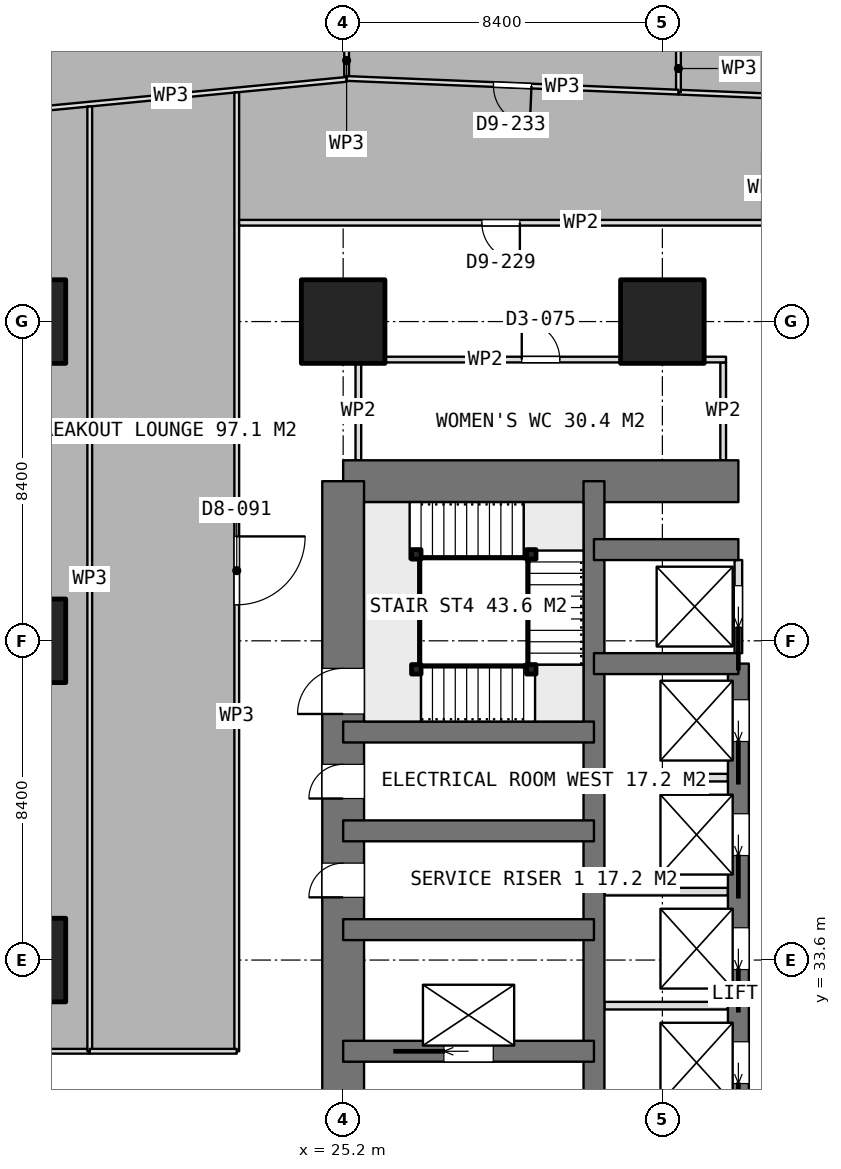
"""IFC4 building model, lengths in metres.
Left out: names, types, materials, properties, quantities, classifications, styles, units other than length and angle.
Written with IfcOpenShell. Run it as: python <this file> out.ifc"""

import sys

from ifc_helpers import new_model, si_unit, direction, frame, frame_2d, origin, origin_2d, place, context, subcontext, project, spatial, rectangle, extrude, element, fill, save


model = new_model("IFC4")
c1 = context("Model", 3, precision=1e-05, world=origin(), true_north=direction((0.0, 1.0)))
c2 = subcontext(c1, "Body", "Model", "MODEL_VIEW")
j1 = project(units=[si_unit("LENGTHUNIT", "METRE"), si_unit("PLANEANGLEUNIT", "RADIAN")], contexts=[c1])
p1 = place(None, origin())
s1 = spatial("IfcSite", under=j1, at=p1, CompositionType="ELEMENT")
p2 = place(p1, origin())
s2 = spatial("IfcBuilding", under=s1, at=p2, CompositionType="ELEMENT")
p3 = place(p2, frame((0.0, 0.0, 66.65)))
s3 = spatial("IfcBuildingStorey", under=s2, at=p3, CompositionType="ELEMENT", Elevation=66.65)
p4 = place(p3, frame((25.2, 46.2, 0.0), z_axis=(0.0, 0.0, 1.0), x_axis=(1.0, 0.0, 0.0)))
e1 = element("IfcWall", 1, at=p4, inside=s3, PredefinedType="SHEAR", context=c2, shape_type="SweptSolid", body=[
    extrude(rectangle(XDim=10.4, YDim=1.1, at=frame_2d((5.2, 0.0))), origin(), (0.0, 0.0, 1.0), 3.75),
])
p5 = place(p3, frame((25.2, 21.0, 0.0), z_axis=(0.0, 0.0, 1.0), x_axis=(0.0, 1.0, 0.0)))
e2 = element("IfcWall", 2, at=p5, inside=s3, PredefinedType="SHEAR", context=c2, shape_type="SweptSolid", body=[
    extrude(rectangle(XDim=25.2, YDim=1.1, at=frame_2d((12.6, 0.0))), origin(), (0.0, 0.0, 1.0), 3.75),
])
p6 = place(p5, frame((7.8, 0.0, 0.0)))
e3 = element("IfcOpeningElement", 3, at=p6, cuts=e2, PredefinedType="OPENING", context=c2, shape_type="SweptSolid", body=[
    extrude(rectangle(XDim=1.2, YDim=2.1, at=frame_2d((0.6, 1.05))), frame((0.0, 0.56, 0.0), z_axis=(0.0, -1.0, 0.0), x_axis=(1.0, 0.0, 0.0)), (0.0, 0.0, 1.0), 1.12),
])
p7 = place(p5, frame((14.25, 0.0, 0.0)))
e4 = element("IfcOpeningElement", 4, at=p7, cuts=e2, PredefinedType="OPENING", context=c2, shape_type="SweptSolid", body=[
    extrude(rectangle(XDim=0.9, YDim=2.1, at=frame_2d((0.45, 1.05))), frame((0.0, 0.56, 0.0), z_axis=(0.0, -1.0, 0.0), x_axis=(1.0, 0.0, 0.0)), (0.0, 0.0, 1.0), 1.12),
])
p8 = place(p5, frame((16.85, 0.0, 0.0)))
e5 = element("IfcOpeningElement", 5, at=p8, cuts=e2, PredefinedType="OPENING", context=c2, shape_type="SweptSolid", body=[
    extrude(rectangle(XDim=0.9, YDim=2.1, at=frame_2d((0.45, 1.05))), frame((0.0, 0.56, 0.0), z_axis=(0.0, -1.0, 0.0), x_axis=(1.0, 0.0, 0.0)), (0.0, 0.0, 1.0), 1.12),
])
p9 = place(p5, frame((19.075, 0.0, 0.0)))
e6 = element("IfcOpeningElement", 6, at=p9, cuts=e2, PredefinedType="OPENING", context=c2, shape_type="SweptSolid", body=[
    extrude(rectangle(XDim=1.2, YDim=2.1, at=frame_2d((0.6, 1.05))), frame((0.0, 0.56, 0.0), z_axis=(0.0, -1.0, 0.0), x_axis=(1.0, 0.0, 0.0)), (0.0, 0.0, 1.0), 1.12),
])
p10 = place(p3, frame((31.8, 21.0, 0.0), z_axis=(0.0, 0.0, 1.0), x_axis=(0.0, 1.0, 0.0)))
e7 = element("IfcWall", 7, at=p10, inside=s3, PredefinedType="SHEAR", context=c2, shape_type="SweptSolid", body=[
    extrude(rectangle(XDim=25.2, YDim=0.55, at=frame_2d((12.6, 0.0))), origin(), (0.0, 0.0, 1.0), 3.75),
])
p11 = place(p3, frame((35.6, 23.4, 0.0), z_axis=(0.0, 0.0, 1.0), x_axis=(0.0, 1.0, 0.0)))
e8 = element("IfcWall", 8, at=p11, inside=s3, PredefinedType="SHEAR", context=c2, shape_type="SweptSolid", body=[
    extrude(rectangle(XDim=18.0, YDim=0.55, at=frame_2d((9.0, 0.0))), origin(), (0.0, 0.0, 1.0), 3.75),
])
p12 = place(p11, frame((0.95, 0.0, 0.0)))
e9 = element("IfcOpeningElement", 9, at=p12, cuts=e8, PredefinedType="OPENING", context=c2, shape_type="SweptSolid", body=[
    extrude(rectangle(XDim=1.1, YDim=2.1, at=frame_2d((0.55, 1.05))), frame((0.0, 0.285, 0.0), z_axis=(0.0, -1.0, 0.0), x_axis=(1.0, 0.0, 0.0)), (0.0, 0.0, 1.0), 0.57),
])
p13 = place(p11, frame((3.95, 0.0, 0.0)))
e10 = element("IfcOpeningElement", 10, at=p13, cuts=e8, PredefinedType="OPENING", context=c2, shape_type="SweptSolid", body=[
    extrude(rectangle(XDim=1.1, YDim=2.1, at=frame_2d((0.55, 1.05))), frame((0.0, 0.285, 0.0), z_axis=(0.0, -1.0, 0.0), x_axis=(1.0, 0.0, 0.0)), (0.0, 0.0, 1.0), 0.57),
])
p14 = place(p11, frame((6.95, 0.0, 0.0)))
e11 = element("IfcOpeningElement", 11, at=p14, cuts=e8, PredefinedType="OPENING", context=c2, shape_type="SweptSolid", body=[
    extrude(rectangle(XDim=1.1, YDim=2.1, at=frame_2d((0.55, 1.05))), frame((0.0, 0.285, 0.0), z_axis=(0.0, -1.0, 0.0), x_axis=(1.0, 0.0, 0.0)), (0.0, 0.0, 1.0), 0.57),
])
p15 = place(p11, frame((9.95, 0.0, 0.0)))
e12 = element("IfcOpeningElement", 12, at=p15, cuts=e8, PredefinedType="OPENING", context=c2, shape_type="SweptSolid", body=[
    extrude(rectangle(XDim=1.1, YDim=2.1, at=frame_2d((0.55, 1.05))), frame((0.0, 0.285, 0.0), z_axis=(0.0, -1.0, 0.0), x_axis=(1.0, 0.0, 0.0)), (0.0, 0.0, 1.0), 0.57),
])
p16 = place(p11, frame((12.95, 0.0, 0.0)))
e13 = element("IfcOpeningElement", 13, at=p16, cuts=e8, PredefinedType="OPENING", context=c2, shape_type="SweptSolid", body=[
    extrude(rectangle(XDim=1.1, YDim=2.1, at=frame_2d((0.55, 1.05))), frame((0.0, 0.285, 0.0), z_axis=(0.0, -1.0, 0.0), x_axis=(1.0, 0.0, 0.0)), (0.0, 0.0, 1.0), 0.57),
])
p17 = place(p11, frame((15.95, 0.0, 0.0)))
e14 = element("IfcOpeningElement", 14, at=p17, cuts=e8, PredefinedType="OPENING", context=c2, shape_type="SweptSolid", body=[
    extrude(rectangle(XDim=1.1, YDim=2.1, at=frame_2d((0.55, 1.05))), frame((0.0, 0.285, 0.0), z_axis=(0.0, -1.0, 0.0), x_axis=(1.0, 0.0, 0.0)), (0.0, 0.0, 1.0), 0.57),
])
for number, where, z_axis, x_axis in (
    (15, (31.8, 41.4, 0.0), (0.0, 0.0, 1.0), (1.0, 0.0, 0.0)),
    (16, (31.8, 44.4, 0.0), (0.0, 0.0, 1.0), (1.0, 0.0, 0.0)),
):
    element("IfcWall", number, at=place(p3, frame(where, z_axis=z_axis, x_axis=x_axis)), inside=s3, PredefinedType="SHEAR", context=c2, shape_type="SweptSolid", body=[
        extrude(rectangle(XDim=3.8, YDim=0.55, at=frame_2d((1.9, 0.0))), origin(), (0.0, 0.0, 1.0), 3.75),
    ])
p18 = place(p3, frame((25.2, 31.2, 0.0), z_axis=(0.0, 0.0, 1.0), x_axis=(1.0, 0.0, 0.0)))
e17 = element("IfcWall", 17, at=p18, inside=s3, PredefinedType="SHEAR", context=c2, shape_type="SweptSolid", body=[
    extrude(rectangle(XDim=6.6, YDim=0.55, at=frame_2d((3.3, 0.0))), origin(), (0.0, 0.0, 1.0), 3.75),
])
p19 = place(p18, frame((2.65, 0.0, 0.0)))
e18 = element("IfcOpeningElement", 18, at=p19, cuts=e17, PredefinedType="OPENING", context=c2, shape_type="SweptSolid", body=[
    extrude(rectangle(XDim=1.3, YDim=2.1, at=frame_2d((0.65, 1.05))), frame((0.0, 0.285, 0.0), z_axis=(0.0, -1.0, 0.0), x_axis=(1.0, 0.0, 0.0)), (0.0, 0.0, 1.0), 0.57),
])
for number, where, z_axis, x_axis in (
    (19, (25.2, 34.4, 0.0), (0.0, 0.0, 1.0), (1.0, 0.0, 0.0)),
    (20, (25.2, 37.0, 0.0), (0.0, 0.0, 1.0), (1.0, 0.0, 0.0)),
    (21, (25.2, 39.6, 0.0), (0.0, 0.0, 1.0), (1.0, 0.0, 0.0)),
):
    element("IfcWall", number, at=place(p3, frame(where, z_axis=z_axis, x_axis=x_axis)), inside=s3, PredefinedType="SHEAR", context=c2, shape_type="SweptSolid", body=[
        extrude(rectangle(XDim=6.6, YDim=0.55, at=frame_2d((3.3, 0.0))), origin(), (0.0, 0.0, 1.0), 3.75),
    ])
for number, where, z_axis, x_axis in (
    (22, (16.8, 33.6, 0.0), (0.0, 0.0, 1.0), (1.0, 0.0, 0.0)),
    (23, (16.8, 42.0, 0.0), (0.0, 0.0, 1.0), (1.0, 0.0, 0.0)),
    (24, (16.8, 50.4, 0.0), (0.0, 0.0, 1.0), (1.0, 0.0, 0.0)),
    (25, (25.2, 50.4, 0.0), (0.0, 0.0, 1.0), (1.0, 0.0, 0.0)),
    (26, (33.6, 50.4, 0.0), (0.0, 0.0, 1.0), (1.0, 0.0, 0.0)),
):
    element("IfcColumn", number, at=place(p3, frame(where, z_axis=z_axis, x_axis=x_axis)), inside=s3, PredefinedType="COLUMN", context=c2, shape_type="SweptSolid", body=[
        extrude(rectangle(XDim=2.2, YDim=2.2, at=origin_2d()), origin(), (0.0, 0.0, 1.0), 3.75),
    ])
for number, where, z_axis, x_axis in (
    (27, (32.075, 32.4, 0.0), (0.0, 0.0, 1.0), (1.0, 0.0, 0.0)),
    (28, (32.075, 35.4, 0.0), (0.0, 0.0, 1.0), (1.0, 0.0, 0.0)),
    (29, (32.075, 38.4, 0.0), (0.0, 0.0, 1.0), (1.0, 0.0, 0.0)),
):
    element("IfcWall", number, at=place(p3, frame(where, z_axis=z_axis, x_axis=x_axis)), inside=s3, PredefinedType="PARTITIONING", context=c2, shape_type="SweptSolid", body=[
        extrude(rectangle(XDim=3.25, YDim=0.2, at=frame_2d((1.625, 0.0))), origin(), (0.0, 0.0, 1.0), 3.5),
    ])
p20 = place(p3, frame((35.6, 41.675, 0.0), z_axis=(0.0, 0.0, 1.0), x_axis=(0.0, 1.0, 0.0)))
e30 = element("IfcWall", 30, at=p20, inside=s3, PredefinedType="PARTITIONING", context=c2, shape_type="SweptSolid", body=[
    extrude(rectangle(XDim=2.45, YDim=0.2, at=frame_2d((1.225, 0.0))), origin(), (0.0, 0.0, 1.0), 3.5),
])
p21 = place(p20, frame((0.675, 0.0, 0.0)))
e31 = element("IfcOpeningElement", 31, at=p21, cuts=e30, PredefinedType="OPENING", context=c2, shape_type="SweptSolid", body=[
    extrude(rectangle(XDim=1.1, YDim=2.1, at=frame_2d((0.55, 1.05))), frame((0.0, 0.11, 0.0), z_axis=(0.0, -1.0, 0.0), x_axis=(1.0, 0.0, 0.0)), (0.0, 0.0, 1.0), 0.22),
])
p22 = place(p3, frame((25.525, 49.4, 0.0), z_axis=(0.0, 0.0, 1.0), x_axis=(1.0, 0.0, 0.0)))
e32 = element("IfcWall", 32, at=p22, inside=s3, PredefinedType="PARTITIONING", context=c2, shape_type="SweptSolid", body=[
    extrude(rectangle(XDim=9.75, YDim=0.15, at=frame_2d((4.875, 0.0))), origin(), (0.0, 0.0, 1.0), 3.5),
])
p23 = place(p22, frame((4.375, 0.0, 0.0)))
e33 = element("IfcOpeningElement", 33, at=p23, cuts=e32, PredefinedType="OPENING", context=c2, shape_type="SweptSolid", body=[
    extrude(rectangle(XDim=1.0, YDim=2.1, at=frame_2d((0.5, 1.05))), frame((0.0, 0.085, 0.0), z_axis=(0.0, -1.0, 0.0), x_axis=(1.0, 0.0, 0.0)), (0.0, 0.0, 1.0), 0.17),
])
for number, where, z_axis, x_axis in (
    (34, (25.6, 46.75, 0.0), (0.0, 0.0, 1.0), (0.0, 1.0, 0.0)),
    (35, (35.2, 46.75, 0.0), (0.0, 0.0, 1.0), (0.0, 1.0, 0.0)),
):
    element("IfcWall", number, at=place(p3, frame(where, z_axis=z_axis, x_axis=x_axis)), inside=s3, PredefinedType="PARTITIONING", context=c2, shape_type="SweptSolid", body=[
        extrude(rectangle(XDim=2.575, YDim=0.15, at=frame_2d((1.288, 0.0))), origin(), (0.0, 0.0, 1.0), 3.5),
    ])
p24 = place(p3, frame((42.718, 56.078, 0.0), z_axis=(0.0, 0.0, 1.0), x_axis=(-0.99914812822, 0.041267637136, 0.0)))
e36 = element("IfcWall", 36, at=p24, inside=s3, PredefinedType="PARTITIONING", context=c2, shape_type="SweptSolid", body=[
    extrude(rectangle(XDim=8.702, YDim=0.125, at=frame_2d((4.351, 0.0))), origin(), (0.0, 0.0, 1.0), 3.5),
])
p25 = place(p24, frame((3.851, 0.0, 0.0)))
e37 = element("IfcOpeningElement", 37, at=p25, cuts=e36, PredefinedType="OPENING", context=c2, shape_type="SweptSolid", body=[
    extrude(rectangle(XDim=1.0, YDim=2.1, at=frame_2d((0.5, 1.05))), frame((0.0, 0.073, 0.0), z_axis=(0.0, -1.0, 0.0), x_axis=(1.0, 0.0, 0.0)), (0.0, 0.0, 1.0), 0.145),
])
p26 = place(p3, frame((34.023, 56.437, 0.0), z_axis=(0.0, 0.0, 1.0), x_axis=(0.0, 1.0, 0.0)))
e38 = element("IfcWall", 38, at=p26, inside=s3, PredefinedType="PARTITIONING", context=c2, shape_type="SweptSolid", body=[
    extrude(rectangle(XDim=1.243, YDim=0.125, at=frame_2d((0.622, 0.0))), origin(), (0.0, 0.0, 1.0), 3.5),
])
p27 = place(p3, frame((34.021, 56.437, 0.0), z_axis=(0.0, 0.0, 1.0), x_axis=(-0.999150892364, 0.041200658827, 0.0)))
e39 = element("IfcWall", 39, at=p27, inside=s3, PredefinedType="PARTITIONING", context=c2, shape_type="SweptSolid", body=[
    extrude(rectangle(XDim=8.74, YDim=0.125, at=frame_2d((4.37, 0.0))), origin(), (0.0, 0.0, 1.0), 3.5),
])
p28 = place(p27, frame((3.869, 0.0, 0.0)))
e40 = element("IfcOpeningElement", 40, at=p28, cuts=e39, PredefinedType="OPENING", context=c2, shape_type="SweptSolid", body=[
    extrude(rectangle(XDim=1.0, YDim=2.1, at=frame_2d((0.5, 1.05))), frame((0.0, 0.073, 0.0), z_axis=(0.0, -1.0, 0.0), x_axis=(1.0, 0.0, 0.0)), (0.0, 0.0, 1.0), 0.145),
])
p29 = place(p3, frame((25.291, 56.859, 0.0), z_axis=(0.0, 0.0, 1.0), x_axis=(0.0, 1.0, 0.0)))
e41 = element("IfcWall", 41, at=p29, inside=s3, PredefinedType="PARTITIONING", context=c2, shape_type="SweptSolid", body=[
    extrude(rectangle(XDim=0.821, YDim=0.125, at=frame_2d((0.411, 0.0))), origin(), (0.0, 0.0, 1.0), 3.5),
])
p30 = place(p3, frame((25.287, 56.772, 0.0), z_axis=(0.0, 0.0, 1.0), x_axis=(-0.995407630517, -0.095726950797, 0.0)))
e42 = element("IfcWall", 42, at=p30, inside=s3, PredefinedType="PARTITIONING", context=c2, shape_type="SweptSolid", body=[
    extrude(rectangle(XDim=9.276, YDim=0.125, at=frame_2d((4.638, 0.0))), origin(), (0.0, 0.0, 1.0), 3.5),
])
p31 = place(p3, frame((18.532, 31.2, 0.0), z_axis=(0.0, 0.0, 1.0), x_axis=(-1.0, 0.0, 0.0)))
e43 = element("IfcWall", 43, at=p31, inside=s3, PredefinedType="PARTITIONING", context=c2, shape_type="SweptSolid", body=[
    extrude(rectangle(XDim=11.897, YDim=0.125, at=frame_2d((5.948, 0.0))), origin(), (0.0, 0.0, 1.0), 3.5),
])
p32 = place(p31, frame((5.433, 0.0, 0.0)))
e44 = element("IfcOpeningElement", 44, at=p32, cuts=e43, PredefinedType="OPENING", context=c2, shape_type="SweptSolid", body=[
    extrude(rectangle(XDim=1.0, YDim=2.1, at=frame_2d((0.5, 1.05))), frame((0.0, 0.073, 0.0), z_axis=(0.0, -1.0, 0.0), x_axis=(1.0, 0.0, 0.0)), (0.0, 0.0, 1.0), 0.145),
])
p33 = place(p3, frame((18.532, 56.059, 0.0), z_axis=(0.0, 0.0, 1.0), x_axis=(0.0, -1.0, 0.0)))
e45 = element("IfcWall", 45, at=p33, inside=s3, PredefinedType="PARTITIONING", context=c2, shape_type="SweptSolid", body=[
    extrude(rectangle(XDim=24.859, YDim=0.125, at=frame_2d((12.43, 0.0))), origin(), (0.0, 0.0, 1.0), 3.5),
])
p34 = place(p3, frame((22.4, 56.431, 0.0), z_axis=(0.0, 0.0, 1.0), x_axis=(0.0, -1.0, 0.0)))
e46 = element("IfcWall", 46, at=p34, inside=s3, PredefinedType="PARTITIONING", context=c2, shape_type="SweptSolid", body=[
    extrude(rectangle(XDim=25.231, YDim=0.125, at=frame_2d((12.615, 0.0))), origin(), (0.0, 0.0, 1.0), 3.5),
])
p35 = place(p34, frame((11.684, 0.0, 0.0)))
e47 = element("IfcOpeningElement", 47, at=p35, cuts=e46, PredefinedType="OPENING", context=c2, shape_type="SweptSolid", body=[
    extrude(rectangle(XDim=1.8, YDim=2.1, at=frame_2d((0.9, 1.05))), frame((0.0, 0.073, 0.0), z_axis=(0.0, -1.0, 0.0), x_axis=(1.0, 0.0, 0.0)), (0.0, 0.0, 1.0), 0.145),
])
p36 = place(p3, frame((22.4, 31.2, 0.0), z_axis=(0.0, 0.0, 1.0), x_axis=(-1.0, 0.0, 0.0)))
e48 = element("IfcWall", 48, at=p36, inside=s3, PredefinedType="PARTITIONING", context=c2, shape_type="SweptSolid", body=[
    extrude(rectangle(XDim=3.868, YDim=0.125, at=frame_2d((1.934, 0.0))), origin(), (0.0, 0.0, 1.0), 3.5),
])
p37 = place(p3, frame((36.3, 53.0, 0.0), z_axis=(0.0, 0.0, 1.0), x_axis=(-1.0, 0.0, 0.0)))
e49 = element("IfcWall", 49, at=p37, inside=s3, PredefinedType="PARTITIONING", context=c2, shape_type="SweptSolid", body=[
    extrude(rectangle(XDim=13.838, YDim=0.15, at=frame_2d((6.919, 0.0))), origin(), (0.0, 0.0, 1.0), 3.5),
])
p38 = place(p37, frame((6.45, 0.0, 0.0)))
e50 = element("IfcOpeningElement", 50, at=p38, cuts=e49, PredefinedType="OPENING", context=c2, shape_type="SweptSolid", body=[
    extrude(rectangle(XDim=1.0, YDim=2.1, at=frame_2d((0.5, 1.05))), frame((0.0, 0.085, 0.0), z_axis=(0.0, -1.0, 0.0), x_axis=(1.0, 0.0, 0.0)), (0.0, 0.0, 1.0), 0.17),
])
for number, where, z_axis, x_axis in (
    (51, (27.125, 41.25, 0.0), (0.0, 0.0, 1.0), (1.0, 0.0, 0.0)),
    (52, (30.15, 41.25, 0.0), (0.0, 0.0, 1.0), (1.0, 0.0, 0.0)),
    (53, (30.15, 44.275, 0.0), (0.0, 0.0, 1.0), (1.0, 0.0, 0.0)),
    (54, (27.125, 44.275, 0.0), (0.0, 0.0, 1.0), (1.0, 0.0, 0.0)),
):
    element("IfcColumn", number, at=place(p3, frame(where, z_axis=z_axis, x_axis=x_axis)), inside=s3, PredefinedType="COLUMN", context=c2, shape_type="SweptSolid", body=[
        extrude(rectangle(XDim=0.25, YDim=0.25, at=origin_2d()), origin(), (0.0, 0.0, 1.0), 3.75),
    ])
p39 = place(p7, origin())
e55 = element("IfcDoor", 55, at=p39, inside=s3, OperationType="SINGLE_SWING_LEFT", PredefinedType="DOOR", context=c2, shape_type="SweptSolid", body=[
    extrude(rectangle(XDim=0.9, YDim=2.1, at=frame_2d((0.45, 1.05))), frame((0.0, 0.025, 0.0), z_axis=(0.0, -1.0, 0.0), x_axis=(1.0, 0.0, 0.0)), (0.0, 0.0, 1.0), 0.05),
])
fill(e4, e55)
p40 = place(p8, origin())
e56 = element("IfcDoor", 56, at=p40, inside=s3, OperationType="SINGLE_SWING_LEFT", PredefinedType="DOOR", context=c2, shape_type="SweptSolid", body=[
    extrude(rectangle(XDim=0.9, YDim=2.1, at=frame_2d((0.45, 1.05))), frame((0.0, 0.025, 0.0), z_axis=(0.0, -1.0, 0.0), x_axis=(1.0, 0.0, 0.0)), (0.0, 0.0, 1.0), 0.05),
])
fill(e5, e56)
p41 = place(p14, origin())
e57 = element("IfcDoor", 57, at=p41, inside=s3, OperationType="SLIDING_TO_LEFT", PredefinedType="USERDEFINED", context=c2, shape_type="SweptSolid", body=[
    extrude(rectangle(XDim=1.1, YDim=2.1, at=frame_2d((0.55, 1.05))), frame((0.0, 0.025, 0.0), z_axis=(0.0, -1.0, 0.0), x_axis=(1.0, 0.0, 0.0)), (0.0, 0.0, 1.0), 0.05),
])
fill(e11, e57)
p42 = place(p15, origin())
e58 = element("IfcDoor", 58, at=p42, inside=s3, OperationType="SLIDING_TO_LEFT", PredefinedType="USERDEFINED", context=c2, shape_type="SweptSolid", body=[
    extrude(rectangle(XDim=1.1, YDim=2.1, at=frame_2d((0.55, 1.05))), frame((0.0, 0.025, 0.0), z_axis=(0.0, -1.0, 0.0), x_axis=(1.0, 0.0, 0.0)), (0.0, 0.0, 1.0), 0.05),
])
fill(e12, e58)
p43 = place(p16, origin())
e59 = element("IfcDoor", 59, at=p43, inside=s3, OperationType="SLIDING_TO_LEFT", PredefinedType="USERDEFINED", context=c2, shape_type="SweptSolid", body=[
    extrude(rectangle(XDim=1.1, YDim=2.1, at=frame_2d((0.55, 1.05))), frame((0.0, 0.025, 0.0), z_axis=(0.0, -1.0, 0.0), x_axis=(1.0, 0.0, 0.0)), (0.0, 0.0, 1.0), 0.05),
])
fill(e13, e59)
p44 = place(p17, origin())
e60 = element("IfcDoor", 60, at=p44, inside=s3, OperationType="SLIDING_TO_LEFT", PredefinedType="USERDEFINED", context=c2, shape_type="SweptSolid", body=[
    extrude(rectangle(XDim=1.1, YDim=2.1, at=frame_2d((0.55, 1.05))), frame((0.0, 0.025, 0.0), z_axis=(0.0, -1.0, 0.0), x_axis=(1.0, 0.0, 0.0)), (0.0, 0.0, 1.0), 0.05),
])
fill(e14, e60)
p45 = place(p19, origin())
e61 = element("IfcDoor", 61, at=p45, inside=s3, OperationType="SLIDING_TO_LEFT", PredefinedType="USERDEFINED", context=c2, shape_type="SweptSolid", body=[
    extrude(rectangle(XDim=1.3, YDim=2.1, at=frame_2d((0.65, 1.05))), frame((0.0, 0.025, 0.0), z_axis=(0.0, -1.0, 0.0), x_axis=(1.0, 0.0, 0.0)), (0.0, 0.0, 1.0), 0.05),
])
fill(e18, e61)
p46 = place(p21, origin())
e62 = element("IfcDoor", 62, at=p46, inside=s3, OperationType="SLIDING_TO_LEFT", PredefinedType="USERDEFINED", context=c2, shape_type="SweptSolid", body=[
    extrude(rectangle(XDim=1.1, YDim=2.1, at=frame_2d((0.55, 1.05))), frame((0.0, 0.025, 0.0), z_axis=(0.0, -1.0, 0.0), x_axis=(1.0, 0.0, 0.0)), (0.0, 0.0, 1.0), 0.05),
])
fill(e31, e62)
p47 = place(p23, origin())
e63 = element("IfcDoor", 63, at=p47, inside=s3, OperationType="SINGLE_SWING_LEFT", PredefinedType="DOOR", context=c2, shape_type="SweptSolid", body=[
    extrude(rectangle(XDim=1.0, YDim=2.1, at=frame_2d((0.5, 1.05))), frame((0.0, 0.025, 0.0), z_axis=(0.0, -1.0, 0.0), x_axis=(1.0, 0.0, 0.0)), (0.0, 0.0, 1.0), 0.05),
])
fill(e33, e63)
p48 = place(p28, origin())
e64 = element("IfcDoor", 64, at=p48, inside=s3, OperationType="SINGLE_SWING_LEFT", PredefinedType="DOOR", context=c2, shape_type="SweptSolid", body=[
    extrude(rectangle(XDim=1.0, YDim=2.1, at=frame_2d((0.5, 1.05))), frame((0.0, 0.025, 0.0), z_axis=(0.0, -1.0, 0.0), x_axis=(1.0, 0.0, 0.0)), (0.0, 0.0, 1.0), 0.05),
])
fill(e40, e64)
p49 = place(p35, origin())
e65 = element("IfcDoor", 65, at=p49, inside=s3, OperationType="DOUBLE_DOOR_SINGLE_SWING", PredefinedType="DOOR", context=c2, shape_type="SweptSolid", body=[
    extrude(rectangle(XDim=1.8, YDim=2.1, at=frame_2d((0.9, 1.05))), frame((0.0, 0.025, 0.0), z_axis=(0.0, -1.0, 0.0), x_axis=(1.0, 0.0, 0.0)), (0.0, 0.0, 1.0), 0.05),
])
fill(e47, e65)
p50 = place(p38, origin())
e66 = element("IfcDoor", 66, at=p50, inside=s3, OperationType="SINGLE_SWING_LEFT", PredefinedType="DOOR", context=c2, shape_type="SweptSolid", body=[
    extrude(rectangle(XDim=1.0, YDim=2.1, at=frame_2d((0.5, 1.05))), frame((0.0, 0.025, 0.0), z_axis=(0.0, -1.0, 0.0), x_axis=(1.0, 0.0, 0.0)), (0.0, 0.0, 1.0), 0.05),
])
fill(e50, e66)
p51 = place(p9, origin())
e67 = element("IfcDoor", 67, at=p51, inside=s3, OperationType="SINGLE_SWING_RIGHT", PredefinedType="DOOR", context=c2, shape_type="SweptSolid", body=[
    extrude(rectangle(XDim=1.2, YDim=2.1, at=frame_2d((0.6, 1.05))), frame((0.0, 0.025, 0.0), z_axis=(0.0, -1.0, 0.0), x_axis=(1.0, 0.0, 0.0)), (0.0, 0.0, 1.0), 0.05),
])
fill(e6, e67)
save(model, sys.argv[1])
